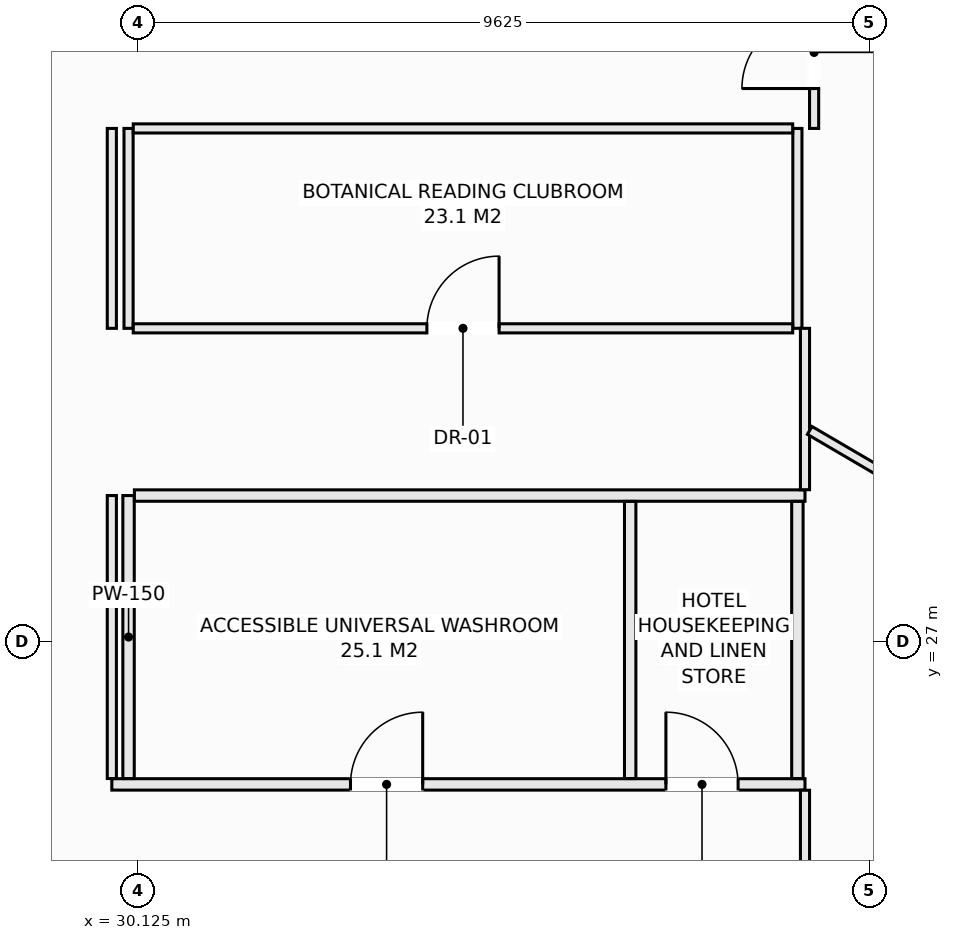
"""IFC4 building model, lengths in metres.
Left out: names, types, materials, properties, quantities, classifications, styles, units other than length and angle.
Written with IfcOpenShell. Run it as: python <this file> out.ifc"""

import sys

from ifc_helpers import new_model, si_unit, direction, frame, frame_2d, origin, place, context, subcontext, project, spatial, rectangle, extrude, element, fill, save


model = new_model("IFC4")
c1 = context("Model", 3, precision=1e-05, world=origin(), true_north=direction((0.0, 1.0)))
c2 = subcontext(c1, "Body", "Model", "MODEL_VIEW")
j1 = project(units=[si_unit("LENGTHUNIT", "METRE"), si_unit("PLANEANGLEUNIT", "RADIAN")], contexts=[c1])
p1 = place(None, origin())
s1 = spatial("IfcSite", under=j1, at=p1, CompositionType="ELEMENT")
p2 = place(p1, origin())
s2 = spatial("IfcBuilding", under=s1, at=p2, CompositionType="ELEMENT")
p3 = place(p2, frame((0.0, 0.0, 142.7)))
s3 = spatial("IfcBuildingStorey", under=s2, at=p3, CompositionType="ELEMENT", Elevation=142.7)
p4 = place(p3, frame((29.78, 25.12, 0.0), z_axis=(0.0, 0.0, 1.0), x_axis=(1.0, 0.0, 0.0)))
e1 = element("IfcWall", 1, at=p4, inside=s3, PredefinedType="PARTITIONING", context=c2, shape_type="SweptSolid", body=[
    extrude(rectangle(XDim=9.12, YDim=0.15, at=frame_2d((4.56, 0.0))), origin(), (0.0, 0.0, 1.0), 3.13),
])
p5 = place(p4, frame((3.14, 0.0, 0.0)))
e2 = element("IfcOpeningElement", 2, at=p5, cuts=e1, PredefinedType="OPENING", context=c2, shape_type="SweptSolid", body=[
    extrude(rectangle(XDim=0.95, YDim=2.1, at=frame_2d((0.475, 1.05))), frame((0.0, 0.085, 0.0), z_axis=(0.0, -1.0, 0.0), x_axis=(1.0, 0.0, 0.0)), (0.0, 0.0, 1.0), 0.17),
])
p6 = place(p4, frame((7.29, 0.0, 0.0)))
e3 = element("IfcOpeningElement", 3, at=p6, cuts=e1, PredefinedType="OPENING", context=c2, shape_type="SweptSolid", body=[
    extrude(rectangle(XDim=0.95, YDim=2.1, at=frame_2d((0.475, 1.05))), frame((0.0, 0.085, 0.0), z_axis=(0.0, -1.0, 0.0), x_axis=(1.0, 0.0, 0.0)), (0.0, 0.0, 1.0), 0.17),
])
p7 = place(p3, frame((30.0, 25.197, 0.0), z_axis=(0.0, 0.0, 1.0), x_axis=(0.0, 1.0, 0.0)))
e4 = element("IfcWall", 4, at=p7, inside=s3, PredefinedType="PARTITIONING", context=c2, shape_type="SweptSolid", body=[
    extrude(rectangle(XDim=3.723, YDim=0.15, at=frame_2d((1.861, 0.0))), origin(), (0.0, 0.0, 1.0), 3.13),
])
p8 = place(p3, frame((30.0, 31.12, 0.0), z_axis=(0.0, 0.0, 1.0), x_axis=(0.0, 1.0, 0.0)))
e5 = element("IfcWall", 5, at=p8, inside=s3, PredefinedType="PARTITIONING", context=c2, shape_type="SweptSolid", body=[
    extrude(rectangle(XDim=2.63, YDim=0.12, at=frame_2d((1.315, 0.0))), origin(), (0.0, 0.0, 1.0), 3.13),
])
p9 = place(p3, frame((30.077, 28.92, 0.0), z_axis=(0.0, 0.0, 1.0), x_axis=(1.0, 0.0, 0.0)))
e6 = element("IfcWall", 6, at=p9, inside=s3, PredefinedType="PARTITIONING", context=c2, shape_type="SweptSolid", body=[
    extrude(rectangle(XDim=8.823, YDim=0.15, at=frame_2d((4.412, 0.0))), origin(), (0.0, 0.0, 1.0), 3.13),
])
for number, where, z_axis, x_axis in (
    (7, (36.6, 25.197, 0.0), (0.0, 0.0, 1.0), (0.0, 1.0, 0.0)),
    (8, (38.8, 25.197, 0.0), (0.0, 0.0, 1.0), (0.0, 1.0, 0.0)),
):
    element("IfcWall", number, at=place(p3, frame(where, z_axis=z_axis, x_axis=x_axis)), inside=s3, PredefinedType="PARTITIONING", context=c2, shape_type="SweptSolid", body=[
        extrude(rectangle(XDim=3.646, YDim=0.15, at=frame_2d((1.823, 0.0))), origin(), (0.0, 0.0, 1.0), 3.13),
    ])
p10 = place(p3, frame((38.8, 31.12, 0.0), z_axis=(0.0, 0.0, 1.0), x_axis=(0.0, 1.0, 0.0)))
e9 = element("IfcWall", 9, at=p10, inside=s3, PredefinedType="PARTITIONING", context=c2, shape_type="SweptSolid", body=[
    extrude(rectangle(XDim=2.63, YDim=0.12, at=frame_2d((1.315, 0.0))), origin(), (0.0, 0.0, 1.0), 3.13),
])
p11 = place(p3, frame((30.062, 31.12, 0.0), z_axis=(0.0, 0.0, 1.0), x_axis=(1.0, 0.0, 0.0)))
e10 = element("IfcWall", 10, at=p11, inside=s3, PredefinedType="PARTITIONING", context=c2, shape_type="SweptSolid", body=[
    extrude(rectangle(XDim=8.676, YDim=0.12, at=frame_2d((4.338, 0.0))), origin(), (0.0, 0.0, 1.0), 3.13),
])
p12 = place(p11, frame((3.863, 0.0, 0.0)))
e11 = element("IfcOpeningElement", 11, at=p12, cuts=e10, PredefinedType="OPENING", context=c2, shape_type="SweptSolid", body=[
    extrude(rectangle(XDim=0.95, YDim=2.1, at=frame_2d((0.475, 1.05))), frame((0.0, 0.07, 0.0), z_axis=(0.0, -1.0, 0.0), x_axis=(1.0, 0.0, 0.0)), (0.0, 0.0, 1.0), 0.14),
])
p13 = place(p3, frame((30.062, 33.75, 0.0), z_axis=(0.0, 0.0, 1.0), x_axis=(1.0, 0.0, 0.0)))
e12 = element("IfcWall", 12, at=p13, inside=s3, PredefinedType="PARTITIONING", context=c2, shape_type="SweptSolid", body=[
    extrude(rectangle(XDim=8.676, YDim=0.12, at=frame_2d((4.338, 0.0))), origin(), (0.0, 0.0, 1.0), 3.13),
])
p14 = place(p3, frame((39.02, 33.75, 0.0), z_axis=(0.0, 0.0, 1.0), x_axis=(0.0, 1.0, 0.0)))
e13 = element("IfcWall", 13, at=p14, inside=s3, PredefinedType="PARTITIONING", context=c2, shape_type="SweptSolid", body=[
    extrude(rectangle(XDim=2.0, YDim=0.12, at=frame_2d((1.0, 0.0))), origin(), (0.0, 0.0, 1.0), 3.13),
])
p15 = place(p14, frame((0.525, 0.0, 0.0)))
e14 = element("IfcOpeningElement", 14, at=p15, cuts=e13, PredefinedType="OPENING", context=c2, shape_type="SweptSolid", body=[
    extrude(rectangle(XDim=0.95, YDim=2.1, at=frame_2d((0.475, 1.05))), frame((0.0, 0.07, 0.0), z_axis=(0.0, -1.0, 0.0), x_axis=(1.0, 0.0, 0.0)), (0.0, 0.0, 1.0), 0.14),
])
p16 = place(p3, frame((29.78, 25.197, 0.0), z_axis=(0.0, 0.0, 1.0), x_axis=(0.0, 1.0, 0.0)))
e15 = element("IfcWall", 15, at=p16, inside=s3, PredefinedType="PARTITIONING", context=c2, shape_type="SweptSolid", body=[
    extrude(rectangle(XDim=3.723, YDim=0.12, at=frame_2d((1.861, 0.0))), origin(), (0.0, 0.0, 1.0), 3.13),
])
p17 = place(p3, frame((29.78, 31.12, 0.0), z_axis=(0.0, 0.0, 1.0), x_axis=(0.0, 1.0, 0.0)))
e16 = element("IfcWall", 16, at=p17, inside=s3, PredefinedType="PARTITIONING", context=c2, shape_type="SweptSolid", body=[
    extrude(rectangle(XDim=2.63, YDim=0.12, at=frame_2d((1.315, 0.0))), origin(), (0.0, 0.0, 1.0), 3.13),
])
p18 = place(p3, frame((38.9, 23.02, 0.0), z_axis=(0.0, 0.0, 1.0), x_axis=(0.0, 1.0, 0.0)))
e17 = element("IfcWall", 17, at=p18, inside=s3, PredefinedType="PARTITIONING", context=c2, shape_type="SweptSolid", body=[
    extrude(rectangle(XDim=2.023, YDim=0.12, at=frame_2d((1.011, 0.0))), origin(), (0.0, 0.0, 1.0), 3.13),
])
p19 = place(p3, frame((38.9, 28.997, 0.0), z_axis=(0.0, 0.0, 1.0), x_axis=(0.0, 1.0, 0.0)))
e18 = element("IfcWall", 18, at=p19, inside=s3, PredefinedType="PARTITIONING", context=c2, shape_type="SweptSolid", body=[
    extrude(rectangle(XDim=2.123, YDim=0.12, at=frame_2d((1.062, 0.0))), origin(), (0.0, 0.0, 1.0), 3.13),
])
p20 = place(p3, frame((38.962, 29.777, 0.0), z_axis=(0.0, 0.0, 1.0), x_axis=(0.862952708635, -0.505284694662, 0.0)))
e19 = element("IfcWall", 19, at=p20, inside=s3, PredefinedType="PARTITIONING", context=c2, shape_type="SweptSolid", body=[
    extrude(rectangle(XDim=14.167, YDim=0.12, at=frame_2d((7.083, 0.0))), origin(), (0.0, 0.0, 1.0), 2.505),
])
p21 = place(p3, frame((39.021, 22.029, 0.0), z_axis=(0.0, 0.0, 1.0), x_axis=(0.601969195984, 0.798519309151, 0.0)))
e20 = element("IfcWall", 20, at=p21, inside=s3, PredefinedType="PARTITIONING", context=c2, shape_type="SweptSolid", body=[
    extrude(rectangle(XDim=6.639, YDim=0.12, at=frame_2d((3.32, 0.0))), origin(), (0.0, 0.0, 1.0), 2.505),
])
p22 = place(p5, origin())
e21 = element("IfcDoor", 21, at=p22, inside=s3, OperationType="SINGLE_SWING_RIGHT", PredefinedType="DOOR", context=c2, shape_type="SweptSolid", body=[
    extrude(rectangle(XDim=0.95, YDim=2.1, at=frame_2d((0.475, 1.05))), frame((0.0, 0.025, 0.0), z_axis=(0.0, -1.0, 0.0), x_axis=(1.0, 0.0, 0.0)), (0.0, 0.0, 1.0), 0.05),
])
fill(e2, e21)
p23 = place(p6, origin())
e22 = element("IfcDoor", 22, at=p23, inside=s3, OperationType="SINGLE_SWING_LEFT", PredefinedType="DOOR", context=c2, shape_type="SweptSolid", body=[
    extrude(rectangle(XDim=0.95, YDim=2.1, at=frame_2d((0.475, 1.05))), frame((0.0, 0.025, 0.0), z_axis=(0.0, -1.0, 0.0), x_axis=(1.0, 0.0, 0.0)), (0.0, 0.0, 1.0), 0.05),
])
fill(e3, e22)
p24 = place(p12, origin())
e23 = element("IfcDoor", 23, at=p24, inside=s3, OperationType="SINGLE_SWING_RIGHT", PredefinedType="DOOR", context=c2, shape_type="SweptSolid", body=[
    extrude(rectangle(XDim=0.95, YDim=2.1, at=frame_2d((0.475, 1.05))), frame((0.0, 0.025, 0.0), z_axis=(0.0, -1.0, 0.0), x_axis=(1.0, 0.0, 0.0)), (0.0, 0.0, 1.0), 0.05),
])
fill(e11, e23)
p25 = place(p15, origin())
e24 = element("IfcDoor", 24, at=p25, inside=s3, OperationType="SINGLE_SWING_LEFT", PredefinedType="DOOR", context=c2, shape_type="SweptSolid", body=[
    extrude(rectangle(XDim=0.95, YDim=2.1, at=frame_2d((0.475, 1.05))), frame((0.0, 0.025, 0.0), z_axis=(0.0, -1.0, 0.0), x_axis=(1.0, 0.0, 0.0)), (0.0, 0.0, 1.0), 0.05),
])
fill(e14, e24)
save(model, sys.argv[1])
